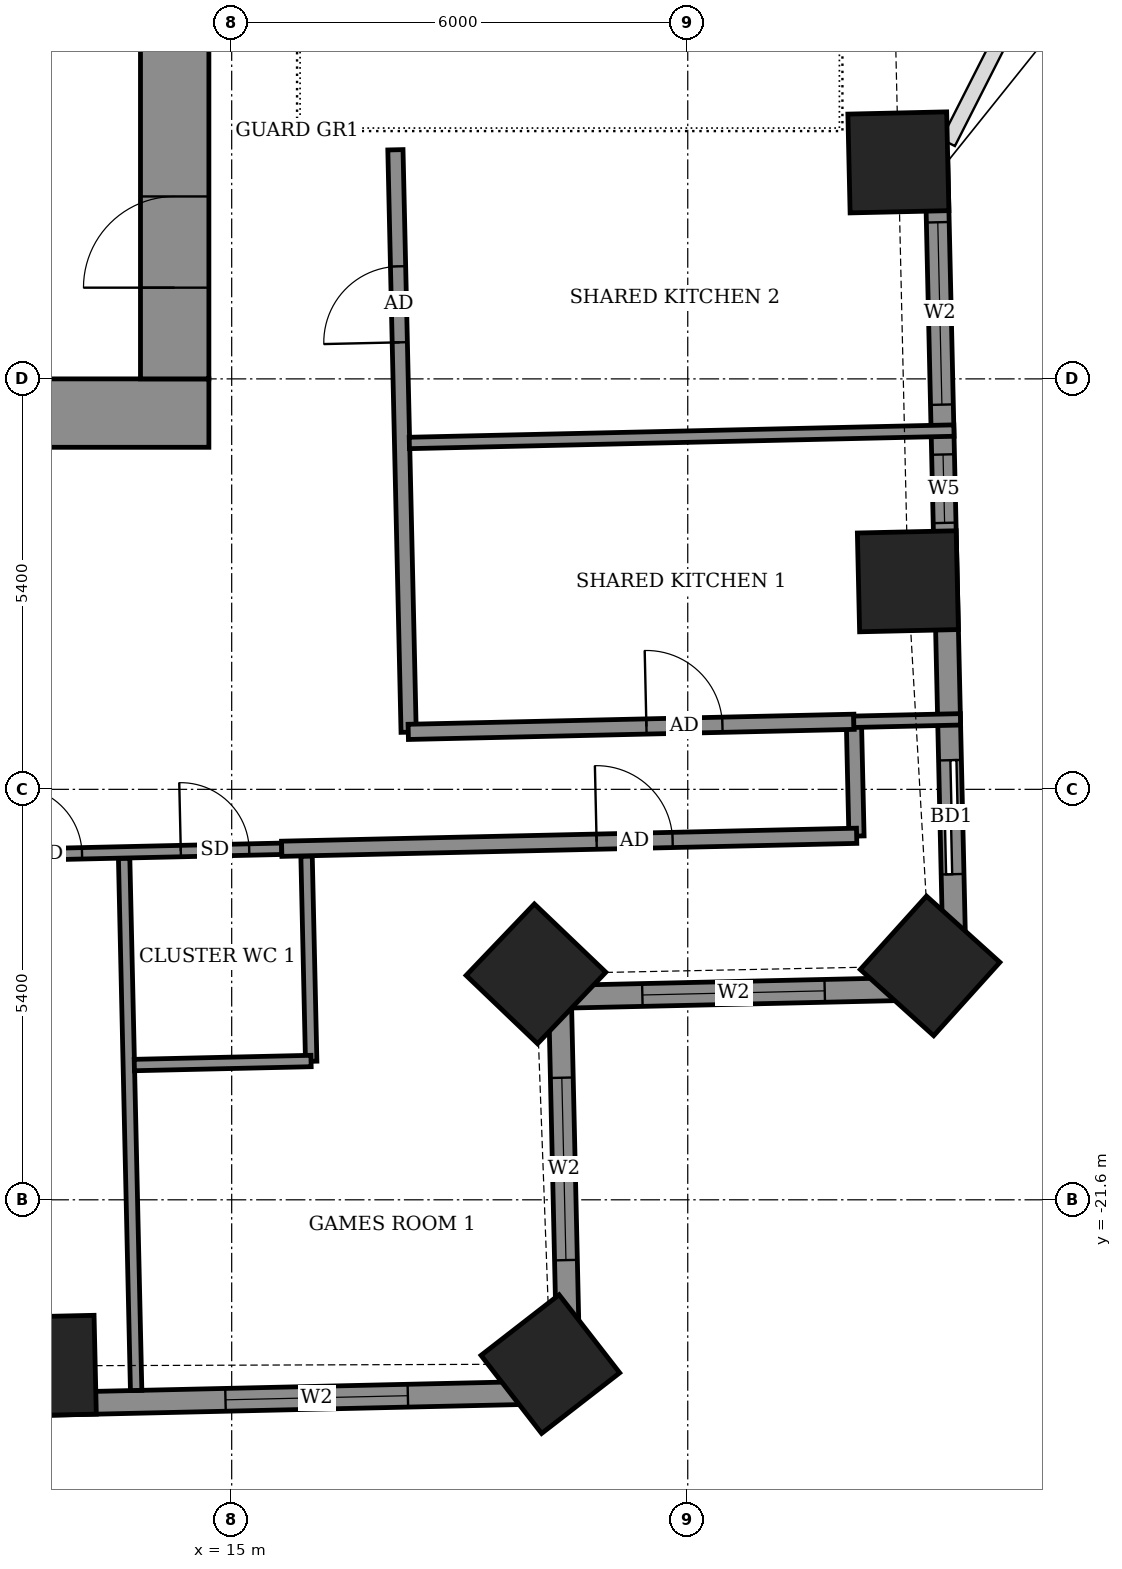
"""IFC4 building model, lengths in metres.
Left out: names, types, materials, properties, quantities, classifications, styles, units other than length and angle.
Written with IfcOpenShell. Run it as: python <this file> out.ifc"""

import sys

from ifc_helpers import new_model, si_unit, direction, frame, frame_2d, origin, origin_2d, place, context, subcontext, project, spatial, rectangle, extrude, element, fill, save


model = new_model("IFC4")
c1 = context("Model", 3, precision=1e-05, world=origin(), true_north=direction((0.0, 1.0)))
c2 = subcontext(c1, "Body", "Model", "MODEL_VIEW")
j1 = project(units=[si_unit("LENGTHUNIT", "METRE"), si_unit("PLANEANGLEUNIT", "RADIAN")], contexts=[c1])
p1 = place(None, origin())
s1 = spatial("IfcSite", under=j1, at=p1, CompositionType="ELEMENT")
p2 = place(p1, origin())
s2 = spatial("IfcBuilding", under=s1, at=p2, CompositionType="ELEMENT")
p3 = place(p2, frame((0.0, 0.0, 140.9)))
s3 = spatial("IfcBuildingStorey", under=s2, at=p3, CompositionType="ELEMENT", Elevation=140.9)
for number, where, z_axis, x_axis in (
    (1, (12.554, -23.784, -0.55), (0.0, 0.0, 1.0), (1.0, 0.023, 0.0)),
    (2, (19.192, -23.761, -0.55), (0.0, 0.0, 1.0), (0.79, 0.613, 0.0)),
    (3, (19.003, -18.627, -0.55), (0.0, 0.0, 1.0), (0.691, 0.723, 0.0)),
    (4, (24.188, -18.523, -0.55), (0.0, 0.0, 1.0), (0.67, 0.743, 0.0)),
    (5, (23.896, -13.463, -0.55), (0.0, 0.0, 1.0), (-0.023, 1.0, 0.0)),
    (6, (23.771, -7.952, -0.55), (0.0, 0.0, 1.0), (-0.023, 1.0, 0.0)),
):
    element("IfcColumn", number, at=place(p3, frame(where, z_axis=z_axis, x_axis=x_axis)), inside=s3, PredefinedType="COLUMN", context=c2, shape_type="SweptSolid", body=[
        extrude(rectangle(XDim=1.3, YDim=1.3, at=origin_2d()), origin(), (0.0, 0.0, 1.0), 3.6),
    ])
p4 = place(p3, frame((24.518, -18.812, 0.0), z_axis=(0.0, 0.0, 1.0), x_axis=(-0.02269451316, 0.999742446369, 0.0)))
e7 = element("IfcWall", 7, at=p4, inside=s3, PredefinedType="SOLIDWALL", context=c2, shape_type="SweptSolid", body=[
    extrude(rectangle(XDim=10.93, YDim=0.3, at=frame_2d((5.465, 0.0))), origin(), (0.0, 0.0, 1.0), 3.05),
])
p5 = place(p4, frame((1.496, 0.0, 0.0)))
e8 = element("IfcOpeningElement", 8, at=p5, cuts=e7, PredefinedType="OPENING", context=c2, shape_type="SweptSolid", body=[
    extrude(rectangle(XDim=1.5, YDim=2.4, at=frame_2d((0.75, 1.2))), frame((0.0, 0.16, 0.0), z_axis=(0.0, -1.0, 0.0), x_axis=(1.0, 0.0, 0.0)), (0.0, 0.0, 1.0), 0.32),
])
p6 = place(p4, frame((6.119, 0.0, 0.9)))
e9 = element("IfcOpeningElement", 9, at=p6, cuts=e7, PredefinedType="OPENING", context=c2, shape_type="SweptSolid", body=[
    extrude(rectangle(XDim=0.9, YDim=1.5, at=frame_2d((0.45, 0.75))), frame((0.0, 0.16, 0.0), z_axis=(0.0, -1.0, 0.0), x_axis=(1.0, 0.0, 0.0)), (0.0, 0.0, 1.0), 0.32),
])
p7 = place(p4, frame((7.675, 0.0, 0.9)))
e10 = element("IfcOpeningElement", 10, at=p7, cuts=e7, PredefinedType="OPENING", context=c2, shape_type="SweptSolid", body=[
    extrude(rectangle(XDim=2.4, YDim=1.5, at=frame_2d((1.2, 0.75))), frame((0.0, 0.16, 0.0), z_axis=(0.0, -1.0, 0.0), x_axis=(1.0, 0.0, 0.0)), (0.0, 0.0, 1.0), 0.32),
])
p8 = place(p3, frame((-22.396, -25.078, 0.0), z_axis=(0.0, 0.0, 1.0), x_axis=(0.99974279854, 0.022678993965, 0.0)))
e11 = element("IfcWall", 11, at=p8, inside=s3, PredefinedType="SOLIDWALL", context=c2, shape_type="SweptSolid", body=[
    extrude(rectangle(XDim=41.844, YDim=0.3, at=frame_2d((20.922, 0.0))), origin(), (0.0, 0.0, 1.0), 3.05),
])
p9 = place(p8, frame((2.196, 0.0, 0.0)))
e12 = element("IfcOpeningElement", 12, at=p9, cuts=e11, PredefinedType="OPENING", context=c2, shape_type="SweptSolid", body=[
    extrude(rectangle(XDim=1.5, YDim=2.4, at=frame_2d((0.75, 1.2))), frame((0.0, 0.16, 0.0), z_axis=(0.0, -1.0, 0.0), x_axis=(1.0, 0.0, 0.0)), (0.0, 0.0, 1.0), 0.32),
])
p10 = place(p8, frame((7.737, 0.0, 0.0)))
e13 = element("IfcOpeningElement", 13, at=p10, cuts=e11, PredefinedType="OPENING", context=c2, shape_type="SweptSolid", body=[
    extrude(rectangle(XDim=1.2, YDim=2.4, at=frame_2d((0.6, 1.2))), frame((0.0, 0.16, 0.0), z_axis=(0.0, -1.0, 0.0), x_axis=(1.0, 0.0, 0.0)), (0.0, 0.0, 1.0), 0.32),
])
p11 = place(p8, frame((10.699, 0.0, 0.0)))
e14 = element("IfcOpeningElement", 14, at=p11, cuts=e11, PredefinedType="OPENING", context=c2, shape_type="SweptSolid", body=[
    extrude(rectangle(XDim=1.5, YDim=2.4, at=frame_2d((0.75, 1.2))), frame((0.0, 0.16, 0.0), z_axis=(0.0, -1.0, 0.0), x_axis=(1.0, 0.0, 0.0)), (0.0, 0.0, 1.0), 0.32),
])
p12 = place(p8, frame((15.549, 0.0, 0.0)))
e15 = element("IfcOpeningElement", 15, at=p12, cuts=e11, PredefinedType="OPENING", context=c2, shape_type="SweptSolid", body=[
    extrude(rectangle(XDim=1.5, YDim=2.4, at=frame_2d((0.75, 1.2))), frame((0.0, 0.16, 0.0), z_axis=(0.0, -1.0, 0.0), x_axis=(1.0, 0.0, 0.0)), (0.0, 0.0, 1.0), 0.32),
])
p13 = place(p8, frame((18.661, 0.0, 0.0)))
e16 = element("IfcOpeningElement", 16, at=p13, cuts=e11, PredefinedType="OPENING", context=c2, shape_type="SweptSolid", body=[
    extrude(rectangle(XDim=1.5, YDim=2.4, at=frame_2d((0.75, 1.2))), frame((0.0, 0.16, 0.0), z_axis=(0.0, -1.0, 0.0), x_axis=(1.0, 0.0, 0.0)), (0.0, 0.0, 1.0), 0.32),
])
p14 = place(p8, frame((24.125, 0.0, 0.0)))
e17 = element("IfcOpeningElement", 17, at=p14, cuts=e11, PredefinedType="OPENING", context=c2, shape_type="SweptSolid", body=[
    extrude(rectangle(XDim=1.5, YDim=2.4, at=frame_2d((0.75, 1.2))), frame((0.0, 0.16, 0.0), z_axis=(0.0, -1.0, 0.0), x_axis=(1.0, 0.0, 0.0)), (0.0, 0.0, 1.0), 0.32),
])
p15 = place(p8, frame((29.298, 0.0, 0.0)))
e18 = element("IfcOpeningElement", 18, at=p15, cuts=e11, PredefinedType="OPENING", context=c2, shape_type="SweptSolid", body=[
    extrude(rectangle(XDim=1.5, YDim=2.4, at=frame_2d((0.75, 1.2))), frame((0.0, 0.16, 0.0), z_axis=(0.0, -1.0, 0.0), x_axis=(1.0, 0.0, 0.0)), (0.0, 0.0, 1.0), 0.32),
])
p16 = place(p8, frame((32.41, 0.0, 0.0)))
e19 = element("IfcOpeningElement", 19, at=p16, cuts=e11, PredefinedType="OPENING", context=c2, shape_type="SweptSolid", body=[
    extrude(rectangle(XDim=1.5, YDim=2.4, at=frame_2d((0.75, 1.2))), frame((0.0, 0.16, 0.0), z_axis=(0.0, -1.0, 0.0), x_axis=(1.0, 0.0, 0.0)), (0.0, 0.0, 1.0), 0.32),
])
p17 = place(p8, frame((37.324, 0.0, 0.9)))
e20 = element("IfcOpeningElement", 20, at=p17, cuts=e11, PredefinedType="OPENING", context=c2, shape_type="SweptSolid", body=[
    extrude(rectangle(XDim=2.4, YDim=1.5, at=frame_2d((1.2, 0.75))), frame((0.0, 0.16, 0.0), z_axis=(0.0, -1.0, 0.0), x_axis=(1.0, 0.0, 0.0)), (0.0, 0.0, 1.0), 0.32),
])
p18 = place(p3, frame((19.437, -24.129, 0.0), z_axis=(0.0, 0.0, 1.0), x_axis=(-0.022675548694, 0.99974287669, 0.0)))
e21 = element("IfcWall", 21, at=p18, inside=s3, PredefinedType="SOLIDWALL", context=c2, shape_type="SweptSolid", body=[
    extrude(rectangle(XDim=5.2, YDim=0.3, at=frame_2d((2.6, 0.0))), origin(), (0.0, 0.0, 1.0), 2.55),
])
p19 = place(p18, frame((1.736, 0.0, 0.9)))
e22 = element("IfcOpeningElement", 22, at=p19, cuts=e21, PredefinedType="OPENING", context=c2, shape_type="SweptSolid", body=[
    extrude(rectangle(XDim=2.4, YDim=1.5, at=frame_2d((1.2, 0.75))), frame((0.0, 0.16, 0.0), z_axis=(0.0, -1.0, 0.0), x_axis=(1.0, 0.0, 0.0)), (0.0, 0.0, 1.0), 0.32),
])
p20 = place(p3, frame((19.319, -18.93, 0.0), z_axis=(0.0, 0.0, 1.0), x_axis=(0.99974287669, 0.022675548694, 0.0)))
e23 = element("IfcWall", 23, at=p20, inside=s3, PredefinedType="SOLIDWALL", context=c2, shape_type="SweptSolid", body=[
    extrude(rectangle(XDim=5.2, YDim=0.3, at=frame_2d((2.6, 0.0))), origin(), (0.0, 0.0, 1.0), 2.55),
])
p21 = place(p20, frame((1.084, 0.0, 0.9)))
e24 = element("IfcOpeningElement", 24, at=p21, cuts=e23, PredefinedType="OPENING", context=c2, shape_type="SweptSolid", body=[
    extrude(rectangle(XDim=2.4, YDim=1.5, at=frame_2d((1.2, 0.75))), frame((0.0, 0.16, 0.0), z_axis=(0.0, -1.0, 0.0), x_axis=(1.0, 0.0, 0.0)), (0.0, 0.0, 1.0), 0.32),
])
p22 = place(p3, frame((13.743, -24.108, 0.0), z_axis=(0.0, 0.0, 1.0), x_axis=(-0.02255982614, 0.999745494736, 0.0)))
e25 = element("IfcWall", 25, at=p22, inside=s3, PredefinedType="PARTITIONING", context=c2, shape_type="SweptSolid", body=[
    extrude(rectangle(XDim=7.002, YDim=0.15, at=frame_2d((3.501, 0.0))), origin(), (0.0, 0.0, 1.0), 2.55),
])
p23 = place(p3, frame((16.046, -19.778, 0.0), z_axis=(0.0, 0.0, 1.0), x_axis=(-0.022518033722, 0.999746436932, 0.0)))
e26 = element("IfcWall", 26, at=p23, inside=s3, PredefinedType="PARTITIONING", context=c2, shape_type="SweptSolid", body=[
    extrude(rectangle(XDim=2.7, YDim=0.15, at=frame_2d((1.35, 0.0))), origin(), (0.0, 0.0, 1.0), 3.05),
])
p24 = place(p3, frame((13.719, -19.827, 0.0), z_axis=(0.0, 0.0, 1.0), x_axis=(0.999740478815, 0.022781023197, 0.0)))
e27 = element("IfcWall", 27, at=p24, inside=s3, PredefinedType="PARTITIONING", context=c2, shape_type="SweptSolid", body=[
    extrude(rectangle(XDim=2.325, YDim=0.15, at=frame_2d((1.163, 0.0))), origin(), (0.0, 0.0, 1.0), 3.05),
])
p25 = place(p3, frame((23.22, -16.815, 0.0), z_axis=(0.0, 0.0, 1.0), x_axis=(-0.022617910375, 0.999744182344, 0.0)))
e28 = element("IfcWall", 28, at=p25, inside=s3, PredefinedType="PARTITIONING", context=c2, shape_type="SweptSolid", body=[
    extrude(rectangle(XDim=1.5, YDim=0.2, at=frame_2d((0.75, 0.0))), origin(), (0.0, 0.0, 1.0), 3.05),
])
p26 = place(p3, frame((-14.871, -17.675, 0.0), z_axis=(0.0, 0.0, 1.0), x_axis=(0.999742359486, 0.02269834024, 0.0)))
e29 = element("IfcWall", 29, at=p26, inside=s3, PredefinedType="PARTITIONING", context=c2, shape_type="SweptSolid", body=[
    extrude(rectangle(XDim=30.536, YDim=0.15, at=frame_2d((15.268, 0.0))), origin(), (0.0, 0.0, 1.0), 3.05),
])
p27 = place(p26, frame((0.284, 0.0, 0.0)))
e30 = element("IfcOpeningElement", 30, at=p27, cuts=e29, PredefinedType="OPENING", context=c2, shape_type="SweptSolid", body=[
    extrude(rectangle(XDim=0.9, YDim=2.1, at=frame_2d((0.45, 1.05))), frame((0.0, 0.085, 0.0), z_axis=(0.0, -1.0, 0.0), x_axis=(1.0, 0.0, 0.0)), (0.0, 0.0, 1.0), 0.17),
])
p28 = place(p26, frame((2.259, 0.0, 0.0)))
e31 = element("IfcOpeningElement", 31, at=p28, cuts=e29, PredefinedType="OPENING", context=c2, shape_type="SweptSolid", body=[
    extrude(rectangle(XDim=0.9, YDim=2.1, at=frame_2d((0.45, 1.05))), frame((0.0, 0.085, 0.0), z_axis=(0.0, -1.0, 0.0), x_axis=(1.0, 0.0, 0.0)), (0.0, 0.0, 1.0), 0.17),
])
p29 = place(p26, frame((9.109, 0.0, 0.0)))
e32 = element("IfcOpeningElement", 32, at=p29, cuts=e29, PredefinedType="OPENING", context=c2, shape_type="SweptSolid", body=[
    extrude(rectangle(XDim=0.9, YDim=2.1, at=frame_2d((0.45, 1.05))), frame((0.0, 0.085, 0.0), z_axis=(0.0, -1.0, 0.0), x_axis=(1.0, 0.0, 0.0)), (0.0, 0.0, 1.0), 0.17),
])
p30 = place(p26, frame((11.109, 0.0, 0.0)))
e33 = element("IfcOpeningElement", 33, at=p30, cuts=e29, PredefinedType="OPENING", context=c2, shape_type="SweptSolid", body=[
    extrude(rectangle(XDim=0.9, YDim=2.1, at=frame_2d((0.45, 1.05))), frame((0.0, 0.085, 0.0), z_axis=(0.0, -1.0, 0.0), x_axis=(1.0, 0.0, 0.0)), (0.0, 0.0, 1.0), 0.17),
])
p31 = place(p26, frame((17.934, 0.0, 0.0)))
e34 = element("IfcOpeningElement", 34, at=p31, cuts=e29, PredefinedType="OPENING", context=c2, shape_type="SweptSolid", body=[
    extrude(rectangle(XDim=0.9, YDim=2.1, at=frame_2d((0.45, 1.05))), frame((0.0, 0.085, 0.0), z_axis=(0.0, -1.0, 0.0), x_axis=(1.0, 0.0, 0.0)), (0.0, 0.0, 1.0), 0.17),
])
p32 = place(p26, frame((20.109, 0.0, 0.0)))
e35 = element("IfcOpeningElement", 35, at=p32, cuts=e29, PredefinedType="OPENING", context=c2, shape_type="SweptSolid", body=[
    extrude(rectangle(XDim=0.9, YDim=2.1, at=frame_2d((0.45, 1.05))), frame((0.0, 0.085, 0.0), z_axis=(0.0, -1.0, 0.0), x_axis=(1.0, 0.0, 0.0)), (0.0, 0.0, 1.0), 0.17),
])
p33 = place(p26, frame((27.009, 0.0, 0.0)))
e36 = element("IfcOpeningElement", 36, at=p33, cuts=e29, PredefinedType="OPENING", context=c2, shape_type="SweptSolid", body=[
    extrude(rectangle(XDim=0.9, YDim=2.1, at=frame_2d((0.45, 1.05))), frame((0.0, 0.085, 0.0), z_axis=(0.0, -1.0, 0.0), x_axis=(1.0, 0.0, 0.0)), (0.0, 0.0, 1.0), 0.17),
])
p34 = place(p26, frame((29.209, 0.0, 0.0)))
e37 = element("IfcOpeningElement", 37, at=p34, cuts=e29, PredefinedType="OPENING", context=c2, shape_type="SweptSolid", body=[
    extrude(rectangle(XDim=0.9, YDim=2.1, at=frame_2d((0.45, 1.05))), frame((0.0, 0.085, 0.0), z_axis=(0.0, -1.0, 0.0), x_axis=(1.0, 0.0, 0.0)), (0.0, 0.0, 1.0), 0.17),
])
p35 = place(p3, frame((15.658, -16.982, 0.0), z_axis=(0.0, 0.0, 1.0), x_axis=(0.99974485859, 0.022587999516, 0.0)))
e38 = element("IfcWall", 38, at=p35, inside=s3, PredefinedType="PARTITIONING", context=c2, shape_type="SweptSolid", body=[
    extrude(rectangle(XDim=7.566, YDim=0.2, at=frame_2d((3.783, 0.0))), origin(), (0.0, 0.0, 1.0), 3.05),
])
p36 = place(p35, frame((4.144, 0.0, 0.0)))
e39 = element("IfcOpeningElement", 39, at=p36, cuts=e38, PredefinedType="OPENING", context=c2, shape_type="SweptSolid", body=[
    extrude(rectangle(XDim=1.0, YDim=2.1, at=frame_2d((0.5, 1.05))), frame((0.0, 0.11, 0.0), z_axis=(0.0, -1.0, 0.0), x_axis=(1.0, 0.0, 0.0)), (0.0, 0.0, 1.0), 0.22),
])
p37 = place(p3, frame((17.328, -15.448, 0.0), z_axis=(0.0, 0.0, 1.0), x_axis=(-0.022680883318, 0.999742755679, 0.0)))
e40 = element("IfcWall", 40, at=p37, inside=s3, PredefinedType="PARTITIONING", context=c2, shape_type="SweptSolid", body=[
    extrude(rectangle(XDim=7.664, YDim=0.2, at=frame_2d((3.832, 0.0))), origin(), (0.0, 0.0, 1.0), 3.05),
])
p38 = place(p37, frame((5.13, 0.0, 0.0)))
e41 = element("IfcOpeningElement", 41, at=p38, cuts=e40, PredefinedType="OPENING", context=c2, shape_type="SweptSolid", body=[
    extrude(rectangle(XDim=1.0, YDim=2.1, at=frame_2d((0.5, 1.05))), frame((0.0, 0.11, 0.0), z_axis=(0.0, -1.0, 0.0), x_axis=(1.0, 0.0, 0.0)), (0.0, 0.0, 1.0), 0.22),
])
p39 = place(p3, frame((17.323, -15.444, 0.0), z_axis=(0.0, 0.0, 1.0), x_axis=(0.999742758565, 0.022680756085, 0.0)))
e42 = element("IfcWall", 42, at=p39, inside=s3, PredefinedType="PARTITIONING", context=c2, shape_type="SweptSolid", body=[
    extrude(rectangle(XDim=5.866, YDim=0.2, at=frame_2d((2.933, 0.0))), origin(), (0.0, 0.0, 1.0), 3.05),
])
p40 = place(p39, frame((3.134, 0.0, 0.0)))
e43 = element("IfcOpeningElement", 43, at=p40, cuts=e42, PredefinedType="OPENING", context=c2, shape_type="SweptSolid", body=[
    extrude(rectangle(XDim=1.0, YDim=2.1, at=frame_2d((0.5, 1.05))), frame((0.0, 0.11, 0.0), z_axis=(0.0, -1.0, 0.0), x_axis=(1.0, 0.0, 0.0)), (0.0, 0.0, 1.0), 0.22),
])
p41 = place(p3, frame((23.184, -15.311, 0.0), z_axis=(0.0, 0.0, 1.0), x_axis=(0.999740577356, 0.022776698371, 0.0)))
e44 = element("IfcWall", 44, at=p41, inside=s3, PredefinedType="PARTITIONING", context=c2, shape_type="SweptSolid", body=[
    extrude(rectangle(XDim=1.404, YDim=0.15, at=frame_2d((0.702, 0.0))), origin(), (0.0, 0.0, 1.0), 2.55),
])
p42 = place(p3, frame((17.337, -11.643, 0.0), z_axis=(0.0, 0.0, 1.0), x_axis=(0.999741061159, 0.022755452803, 0.0)))
e45 = element("IfcWall", 45, at=p42, inside=s3, PredefinedType="PARTITIONING", context=c2, shape_type="SweptSolid", body=[
    extrude(rectangle(XDim=7.167, YDim=0.15, at=frame_2d((3.583, 0.0))), origin(), (0.0, 0.0, 1.0), 2.55),
])
p43 = place(p3, frame((-14.7, -11.25, 0.0), z_axis=(0.0, 0.0, 1.0), x_axis=(1.0, 0.0, 0.0)))
e46 = element("IfcWall", 46, at=p43, inside=s3, PredefinedType="SHEAR", context=c2, shape_type="SweptSolid", body=[
    extrude(rectangle(XDim=29.4, YDim=0.9, at=frame_2d((14.7, 0.0))), origin(), (0.0, 0.0, 1.0), 3.6),
])
p44 = place(p3, frame((14.25, -10.8, 0.0), z_axis=(0.0, 0.0, 1.0), x_axis=(0.0, 1.0, 0.0)))
e47 = element("IfcWall", 47, at=p44, inside=s3, PredefinedType="SHEAR", context=c2, shape_type="SweptSolid", body=[
    extrude(rectangle(XDim=21.6, YDim=0.9, at=frame_2d((10.8, 0.0))), origin(), (0.0, 0.0, 1.0), 3.6),
])
p45 = place(p44, frame((1.2, 0.0, 0.0)))
e48 = element("IfcOpeningElement", 48, at=p45, cuts=e47, PredefinedType="OPENING", context=c2, shape_type="SweptSolid", body=[
    extrude(rectangle(XDim=1.2, YDim=2.1, at=frame_2d((0.6, 1.05))), frame((0.0, 0.46, 0.0), z_axis=(0.0, -1.0, 0.0), x_axis=(1.0, 0.0, 0.0)), (0.0, 0.0, 1.0), 0.92),
])
p46 = place(p5, origin())
e49 = element("IfcDoor", 49, at=p46, inside=s3, OperationType="SLIDING_TO_LEFT", PredefinedType="DOOR", context=c2, shape_type="SweptSolid", body=[
    extrude(rectangle(XDim=1.5, YDim=2.4, at=frame_2d((0.75, 1.2))), frame((0.0, 0.025, 0.0), z_axis=(0.0, -1.0, 0.0), x_axis=(1.0, 0.0, 0.0)), (0.0, 0.0, 1.0), 0.05),
])
fill(e8, e49)
p47 = place(p6, origin())
e50 = element("IfcWindow", 50, at=p47, inside=s3, PartitioningType="SINGLE_PANEL", PredefinedType="WINDOW", context=c2, shape_type="SweptSolid", body=[
    extrude(rectangle(XDim=0.9, YDim=1.5, at=frame_2d((0.45, 0.75))), frame((0.0, 0.03, 0.0), z_axis=(0.0, -1.0, 0.0), x_axis=(1.0, 0.0, 0.0)), (0.0, 0.0, 1.0), 0.06),
])
fill(e9, e50)
p48 = place(p7, origin())
e51 = element("IfcWindow", 51, at=p48, inside=s3, PartitioningType="DOUBLE_PANEL_VERTICAL", PredefinedType="WINDOW", context=c2, shape_type="SweptSolid", body=[
    extrude(rectangle(XDim=2.4, YDim=1.5, at=frame_2d((1.2, 0.75))), frame((0.0, 0.03, 0.0), z_axis=(0.0, -1.0, 0.0), x_axis=(1.0, 0.0, 0.0)), (0.0, 0.0, 1.0), 0.06),
])
fill(e10, e51)
p49 = place(p17, origin())
e52 = element("IfcWindow", 52, at=p49, inside=s3, PartitioningType="DOUBLE_PANEL_VERTICAL", PredefinedType="WINDOW", context=c2, shape_type="SweptSolid", body=[
    extrude(rectangle(XDim=2.4, YDim=1.5, at=frame_2d((1.2, 0.75))), frame((0.0, 0.03, 0.0), z_axis=(0.0, -1.0, 0.0), x_axis=(1.0, 0.0, 0.0)), (0.0, 0.0, 1.0), 0.06),
])
fill(e20, e52)
p50 = place(p19, origin())
e53 = element("IfcWindow", 53, at=p50, inside=s3, PartitioningType="DOUBLE_PANEL_VERTICAL", PredefinedType="WINDOW", context=c2, shape_type="SweptSolid", body=[
    extrude(rectangle(XDim=2.4, YDim=1.5, at=frame_2d((1.2, 0.75))), frame((0.0, 0.03, 0.0), z_axis=(0.0, -1.0, 0.0), x_axis=(1.0, 0.0, 0.0)), (0.0, 0.0, 1.0), 0.06),
])
fill(e22, e53)
p51 = place(p21, origin())
e54 = element("IfcWindow", 54, at=p51, inside=s3, PartitioningType="DOUBLE_PANEL_VERTICAL", PredefinedType="WINDOW", context=c2, shape_type="SweptSolid", body=[
    extrude(rectangle(XDim=2.4, YDim=1.5, at=frame_2d((1.2, 0.75))), frame((0.0, 0.03, 0.0), z_axis=(0.0, -1.0, 0.0), x_axis=(1.0, 0.0, 0.0)), (0.0, 0.0, 1.0), 0.06),
])
fill(e24, e54)
p52 = place(p33, origin())
e55 = element("IfcDoor", 55, at=p52, inside=s3, OperationType="SINGLE_SWING_LEFT", PredefinedType="DOOR", context=c2, shape_type="SweptSolid", body=[
    extrude(rectangle(XDim=0.9, YDim=2.1, at=frame_2d((0.45, 1.05))), frame((0.0, 0.025, 0.0), z_axis=(0.0, -1.0, 0.0), x_axis=(1.0, 0.0, 0.0)), (0.0, 0.0, 1.0), 0.05),
])
fill(e36, e55)
p53 = place(p36, origin())
e56 = element("IfcDoor", 56, at=p53, inside=s3, OperationType="SINGLE_SWING_RIGHT", PredefinedType="DOOR", context=c2, shape_type="SweptSolid", body=[
    extrude(rectangle(XDim=1.0, YDim=2.1, at=frame_2d((0.5, 1.05))), frame((0.0, 0.025, 0.0), z_axis=(0.0, -1.0, 0.0), x_axis=(1.0, 0.0, 0.0)), (0.0, 0.0, 1.0), 0.05),
])
fill(e39, e56)
p54 = place(p34, origin())
e57 = element("IfcDoor", 57, at=p54, inside=s3, OperationType="SINGLE_SWING_RIGHT", PredefinedType="DOOR", context=c2, shape_type="SweptSolid", body=[
    extrude(rectangle(XDim=0.9, YDim=2.1, at=frame_2d((0.45, 1.05))), frame((0.0, 0.025, 0.0), z_axis=(0.0, -1.0, 0.0), x_axis=(1.0, 0.0, 0.0)), (0.0, 0.0, 1.0), 0.05),
])
fill(e37, e57)
p55 = place(p40, origin())
e58 = element("IfcDoor", 58, at=p55, inside=s3, OperationType="SINGLE_SWING_LEFT", PredefinedType="DOOR", context=c2, shape_type="SweptSolid", body=[
    extrude(rectangle(XDim=1.0, YDim=2.1, at=frame_2d((0.5, 1.05))), frame((0.0, 0.025, 0.0), z_axis=(0.0, -1.0, 0.0), x_axis=(1.0, 0.0, 0.0)), (0.0, 0.0, 1.0), 0.05),
])
fill(e43, e58)
p56 = place(p38, origin())
e59 = element("IfcDoor", 59, at=p56, inside=s3, OperationType="SINGLE_SWING_RIGHT", PredefinedType="DOOR", context=c2, shape_type="SweptSolid", body=[
    extrude(rectangle(XDim=1.0, YDim=2.1, at=frame_2d((0.5, 1.05))), frame((0.0, 0.025, 0.0), z_axis=(0.0, -1.0, 0.0), x_axis=(1.0, 0.0, 0.0)), (0.0, 0.0, 1.0), 0.05),
])
fill(e41, e59)
p57 = place(p45, origin())
e60 = element("IfcDoor", 60, at=p57, inside=s3, OperationType="DOUBLE_DOOR_SINGLE_SWING", PredefinedType="DOOR", context=c2, shape_type="SweptSolid", body=[
    extrude(rectangle(XDim=1.2, YDim=2.1, at=frame_2d((0.6, 1.05))), frame((0.0, 0.025, 0.0), z_axis=(0.0, -1.0, 0.0), x_axis=(1.0, 0.0, 0.0)), (0.0, 0.0, 1.0), 0.05),
])
fill(e48, e60)
save(model, sys.argv[1])
